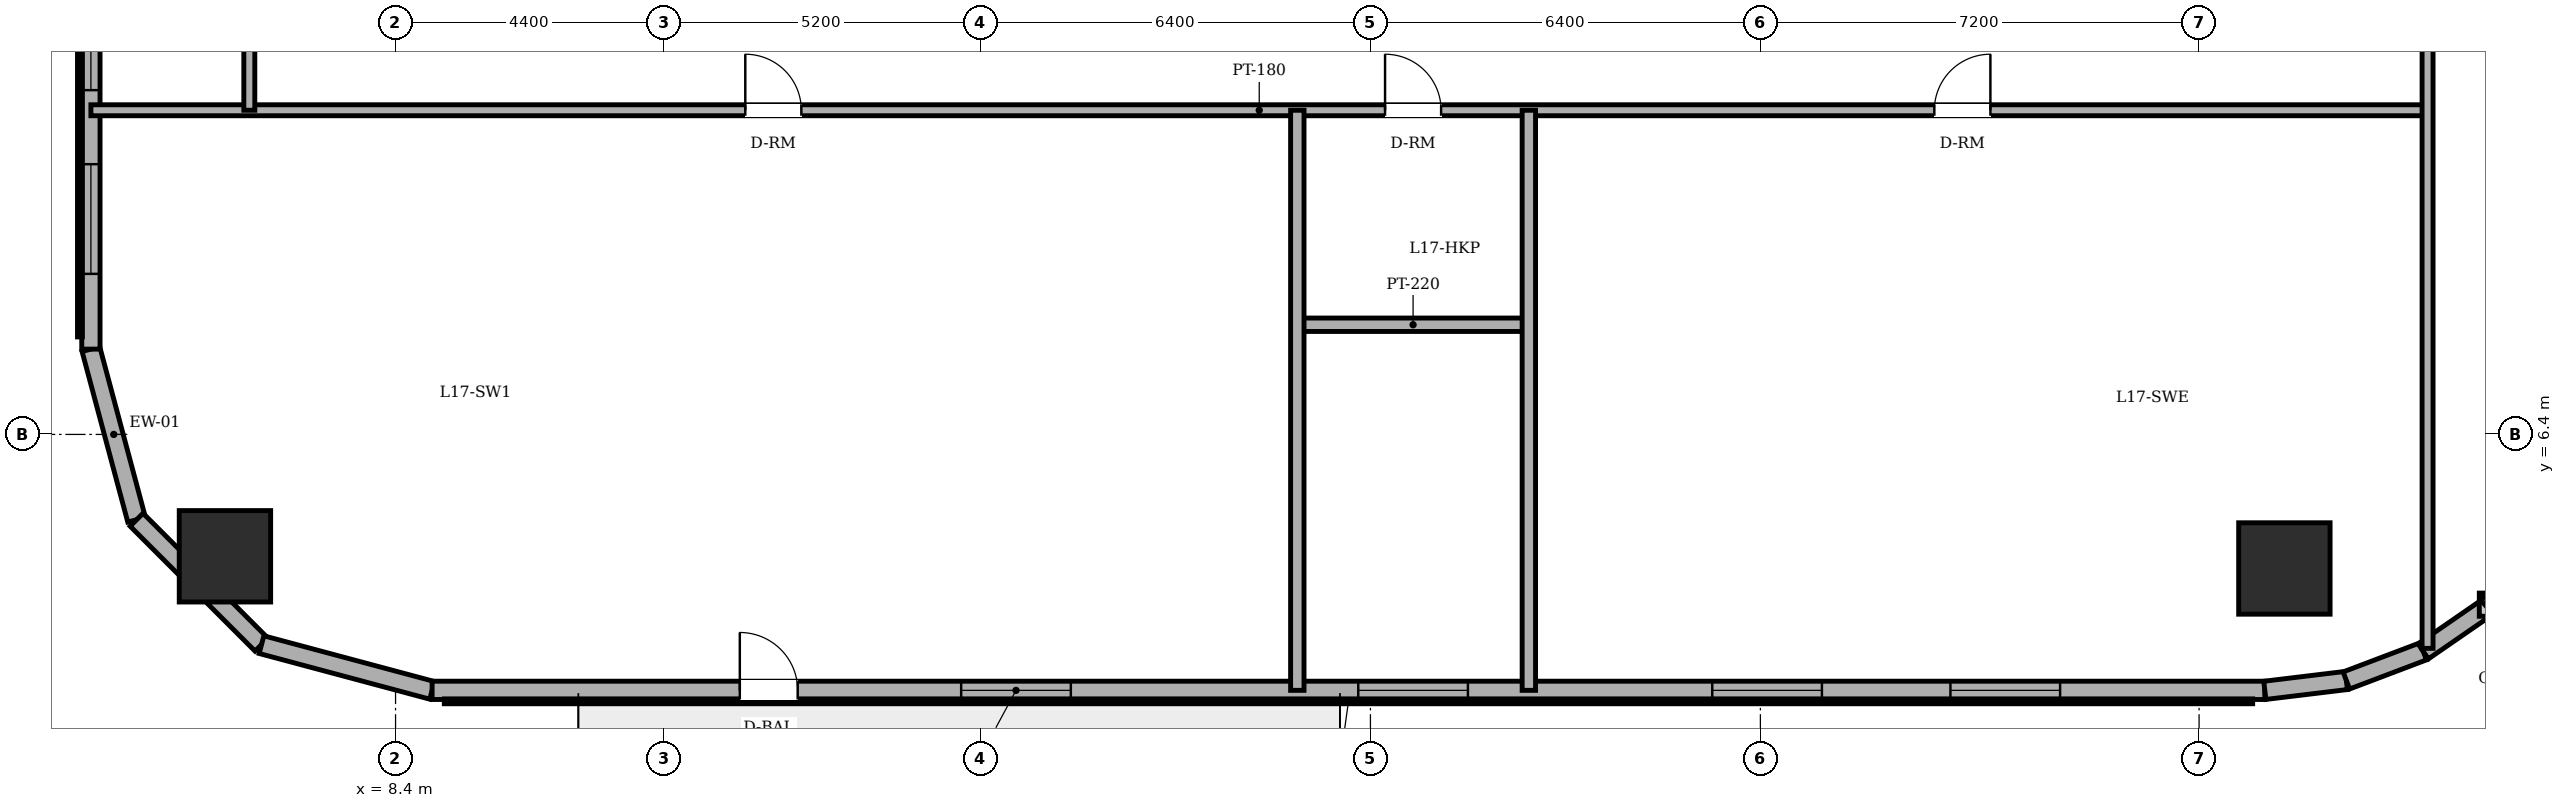
"""IFC4 building model, lengths in metres.
Left out: names, types, materials, properties, quantities, classifications, styles, units other than length and angle.
Written with IfcOpenShell. Run it as: python <this file> out.ifc"""

import sys

from ifc_helpers import new_model, si_unit, direction, frame, frame_2d, origin, origin_2d, place, context, subcontext, project, spatial, rectangle, circle, extrude, element, fill, save


model = new_model("IFC4")
c1 = context("Model", 3, precision=1e-05, world=origin(), true_north=direction((0.0, 1.0)))
c2 = subcontext(c1, "Body", "Model", "MODEL_VIEW")
j1 = project(units=[si_unit("LENGTHUNIT", "METRE"), si_unit("PLANEANGLEUNIT", "RADIAN")], contexts=[c1])
p1 = place(None, origin())
s1 = spatial("IfcSite", under=j1, at=p1, CompositionType="ELEMENT")
p2 = place(p1, origin())
s2 = spatial("IfcBuilding", under=s1, at=p2, CompositionType="ELEMENT")
p3 = place(p2, frame((0.0, 0.0, 64.8)))
s3 = spatial("IfcBuildingStorey", under=s2, at=p3, CompositionType="ELEMENT", Elevation=64.8)
for number, where, z_axis, x_axis in (
    (1, (5.6, 4.4, 0.0), (0.0, 0.0, 1.0), (1.0, 0.0, 0.0)),
    (2, (39.4, 4.2, 0.0), (0.0, 0.0, 1.0), (1.0, 0.0, 0.0)),
):
    element("IfcColumn", number, at=place(p3, frame(where, z_axis=z_axis, x_axis=x_axis)), inside=s3, PredefinedType="COLUMN", context=c2, shape_type="SweptSolid", body=[
        extrude(circle(Radius=0.75, at=origin_2d()), origin(), (0.0, 0.0, 1.0), 3.6),
    ])
p4 = place(p3, frame((3.4, 7.8, 0.0), z_axis=(0.0, 0.0, 1.0), x_axis=(0.258731875344, -0.96594917914, 0.0)))
e3 = element("IfcWall", 3, at=p4, inside=s3, PredefinedType="SOLIDWALL", context=c2, shape_type="SweptSolid", body=[
    extrude(rectangle(XDim=2.899, YDim=0.3, at=frame_2d((1.449, 0.0))), origin(), (0.0, 0.0, 1.0), 3.4),
])
p5 = place(p3, frame((4.15, 5.0, 0.0), z_axis=(0.0, 0.0, 1.0), x_axis=(0.707106781187, -0.707106781187, 0.0)))
e4 = element("IfcWall", 4, at=p5, inside=s3, PredefinedType="SOLIDWALL", context=c2, shape_type="SweptSolid", body=[
    extrude(rectangle(XDim=2.899, YDim=0.3, at=frame_2d((1.45, 0.0))), origin(), (0.0, 0.0, 1.0), 3.4),
])
p6 = place(p3, frame((6.2, 2.95, 0.0), z_axis=(0.0, 0.0, 1.0), x_axis=(0.96594917914, -0.258731875344, 0.0)))
e5 = element("IfcWall", 5, at=p6, inside=s3, PredefinedType="SOLIDWALL", context=c2, shape_type="SweptSolid", body=[
    extrude(rectangle(XDim=2.899, YDim=0.3, at=frame_2d((1.449, 0.0))), origin(), (0.0, 0.0, 1.0), 3.4),
])
p7 = place(p3, frame((9.0, 2.2, 0.0), z_axis=(0.0, 0.0, 1.0), x_axis=(1.0, 0.0, 0.0)))
e6 = element("IfcWall", 6, at=p7, inside=s3, PredefinedType="SOLIDWALL", context=c2, shape_type="SweptSolid", body=[
    extrude(rectangle(XDim=30.079, YDim=0.3, at=frame_2d((15.04, 0.0))), origin(), (0.0, 0.0, 1.0), 3.4),
])
p8 = place(p7, frame((5.05, 0.0, 0.0)))
e7 = element("IfcOpeningElement", 7, at=p8, cuts=e6, PredefinedType="OPENING", context=c2, shape_type="SweptSolid", body=[
    extrude(rectangle(XDim=0.95, YDim=2.2, at=frame_2d((0.475, 1.1))), frame((0.0, 0.16, 0.0), z_axis=(0.0, -1.0, 0.0), x_axis=(1.0, 0.0, 0.0)), (0.0, 0.0, 1.0), 0.32),
])
p9 = place(p7, frame((8.683, 0.0, 0.85)))
e8 = element("IfcOpeningElement", 8, at=p9, cuts=e6, PredefinedType="OPENING", context=c2, shape_type="SweptSolid", body=[
    extrude(rectangle(XDim=1.8, YDim=1.55, at=frame_2d((0.9, 0.775))), frame((0.0, 0.16, 0.0), z_axis=(0.0, -1.0, 0.0), x_axis=(1.0, 0.0, 0.0)), (0.0, 0.0, 1.0), 0.32),
])
p10 = place(p7, frame((15.2, 0.0, 0.85)))
e9 = element("IfcOpeningElement", 9, at=p10, cuts=e6, PredefinedType="OPENING", context=c2, shape_type="SweptSolid", body=[
    extrude(rectangle(XDim=1.8, YDim=1.55, at=frame_2d((0.9, 0.775))), frame((0.0, 0.16, 0.0), z_axis=(0.0, -1.0, 0.0), x_axis=(1.0, 0.0, 0.0)), (0.0, 0.0, 1.0), 0.32),
])
p11 = place(p7, frame((21.01, 0.0, 0.85)))
e10 = element("IfcOpeningElement", 10, at=p11, cuts=e6, PredefinedType="OPENING", context=c2, shape_type="SweptSolid", body=[
    extrude(rectangle(XDim=1.8, YDim=1.55, at=frame_2d((0.9, 0.775))), frame((0.0, 0.16, 0.0), z_axis=(0.0, -1.0, 0.0), x_axis=(1.0, 0.0, 0.0)), (0.0, 0.0, 1.0), 0.32),
])
p12 = place(p7, frame((24.919, 0.0, 0.85)))
e11 = element("IfcOpeningElement", 11, at=p12, cuts=e6, PredefinedType="OPENING", context=c2, shape_type="SweptSolid", body=[
    extrude(rectangle(XDim=1.8, YDim=1.55, at=frame_2d((0.9, 0.775))), frame((0.0, 0.16, 0.0), z_axis=(0.0, -1.0, 0.0), x_axis=(1.0, 0.0, 0.0)), (0.0, 0.0, 1.0), 0.32),
])
p13 = place(p3, frame((39.079, 2.2, 0.0), z_axis=(0.0, 0.0, 1.0), x_axis=(0.992739027259, 0.120288086515, 0.0)))
e12 = element("IfcWall", 12, at=p13, inside=s3, PredefinedType="SOLIDWALL", context=c2, shape_type="SweptSolid", body=[
    extrude(rectangle(XDim=1.348, YDim=0.3, at=frame_2d((0.674, 0.0))), origin(), (0.0, 0.0, 1.0), 3.4),
])
p14 = place(p3, frame((40.417, 2.362, 0.0), z_axis=(0.0, 0.0, 1.0), x_axis=(0.935156721165, 0.354234254216, 0.0)))
e13 = element("IfcWall", 13, at=p14, inside=s3, PredefinedType="SOLIDWALL", context=c2, shape_type="SweptSolid", body=[
    extrude(rectangle(XDim=1.349, YDim=0.3, at=frame_2d((0.675, 0.0))), origin(), (0.0, 0.0, 1.0), 3.4),
])
p15 = place(p3, frame((41.679, 2.84, 0.0), z_axis=(0.0, 0.0, 1.0), x_axis=(0.823116500192, 0.567872544777, 0.0)))
e14 = element("IfcWall", 14, at=p15, inside=s3, PredefinedType="SOLIDWALL", context=c2, shape_type="SweptSolid", body=[
    extrude(rectangle(XDim=1.349, YDim=0.3, at=frame_2d((0.674, 0.0))), origin(), (0.0, 0.0, 1.0), 3.4),
])
p16 = place(p3, frame((3.4, 40.2, 0.0), z_axis=(0.0, 0.0, 1.0), x_axis=(0.0, -1.0, 0.0)))
e15 = element("IfcWall", 15, at=p16, inside=s3, PredefinedType="SOLIDWALL", context=c2, shape_type="SweptSolid", body=[
    extrude(rectangle(XDim=32.4, YDim=0.3, at=frame_2d((16.2, 0.0))), origin(), (0.0, 0.0, 1.0), 3.4),
])
p17 = place(p16, frame((1.235, 0.0, 0.85)))
e16 = element("IfcOpeningElement", 16, at=p17, cuts=e15, PredefinedType="OPENING", context=c2, shape_type="SweptSolid", body=[
    extrude(rectangle(XDim=1.8, YDim=1.55, at=frame_2d((0.9, 0.775))), frame((0.0, 0.16, 0.0), z_axis=(0.0, -1.0, 0.0), x_axis=(1.0, 0.0, 0.0)), (0.0, 0.0, 1.0), 0.32),
])
p18 = place(p16, frame((4.25, 0.0, 0.85)))
e17 = element("IfcOpeningElement", 17, at=p18, cuts=e15, PredefinedType="OPENING", context=c2, shape_type="SweptSolid", body=[
    extrude(rectangle(XDim=1.8, YDim=1.55, at=frame_2d((0.9, 0.775))), frame((0.0, 0.16, 0.0), z_axis=(0.0, -1.0, 0.0), x_axis=(1.0, 0.0, 0.0)), (0.0, 0.0, 1.0), 0.32),
])
p19 = place(p16, frame((12.027, 0.0, 0.85)))
e18 = element("IfcOpeningElement", 18, at=p19, cuts=e15, PredefinedType="OPENING", context=c2, shape_type="SweptSolid", body=[
    extrude(rectangle(XDim=1.8, YDim=1.55, at=frame_2d((0.9, 0.775))), frame((0.0, 0.16, 0.0), z_axis=(0.0, -1.0, 0.0), x_axis=(1.0, 0.0, 0.0)), (0.0, 0.0, 1.0), 0.32),
])
p20 = place(p16, frame((18.573, 0.0, 0.85)))
e19 = element("IfcOpeningElement", 19, at=p20, cuts=e15, PredefinedType="OPENING", context=c2, shape_type="SweptSolid", body=[
    extrude(rectangle(XDim=1.8, YDim=1.55, at=frame_2d((0.9, 0.775))), frame((0.0, 0.16, 0.0), z_axis=(0.0, -1.0, 0.0), x_axis=(1.0, 0.0, 0.0)), (0.0, 0.0, 1.0), 0.32),
])
p21 = place(p16, frame((26.35, 0.0, 0.85)))
e20 = element("IfcOpeningElement", 20, at=p21, cuts=e15, PredefinedType="OPENING", context=c2, shape_type="SweptSolid", body=[
    extrude(rectangle(XDim=1.8, YDim=1.55, at=frame_2d((0.9, 0.775))), frame((0.0, 0.16, 0.0), z_axis=(0.0, -1.0, 0.0), x_axis=(1.0, 0.0, 0.0)), (0.0, 0.0, 1.0), 0.32),
])
p22 = place(p16, frame((29.365, 0.0, 0.85)))
e21 = element("IfcOpeningElement", 21, at=p22, cuts=e15, PredefinedType="OPENING", context=c2, shape_type="SweptSolid", body=[
    extrude(rectangle(XDim=1.8, YDim=1.55, at=frame_2d((0.9, 0.775))), frame((0.0, 0.16, 0.0), z_axis=(0.0, -1.0, 0.0), x_axis=(1.0, 0.0, 0.0)), (0.0, 0.0, 1.0), 0.32),
])
p23 = place(p3, frame((23.2, 8.2, 0.0), z_axis=(0.0, 0.0, 1.0), x_axis=(1.0, 0.0, 0.0)))
e22 = element("IfcWall", 22, at=p23, inside=s3, PredefinedType="PARTITIONING", context=c2, shape_type="SweptSolid", body=[
    extrude(rectangle(XDim=3.8, YDim=0.22, at=frame_2d((1.9, 0.0))), origin(), (0.0, 0.0, 1.0), 3.4),
])
p24 = place(p3, frame((3.4, 11.72, 0.0), z_axis=(0.0, 0.0, 1.0), x_axis=(1.0, 0.0, 0.0)))
e23 = element("IfcWall", 23, at=p24, inside=s3, PredefinedType="PARTITIONING", context=c2, shape_type="SweptSolid", body=[
    extrude(rectangle(XDim=38.35, YDim=0.18, at=frame_2d((19.175, 0.0))), origin(), (0.0, 0.0, 1.0), 3.4),
])
p25 = place(p24, frame((21.24, 0.0, 0.0)))
e24 = element("IfcOpeningElement", 24, at=p25, cuts=e23, PredefinedType="OPENING", context=c2, shape_type="SweptSolid", body=[
    extrude(rectangle(XDim=0.92, YDim=2.1, at=frame_2d((0.46, 1.05))), frame((0.0, 0.1, 0.0), z_axis=(0.0, -1.0, 0.0), x_axis=(1.0, 0.0, 0.0)), (0.0, 0.0, 1.0), 0.2),
])
p26 = place(p24, frame((10.74, 0.0, 0.0)))
e25 = element("IfcOpeningElement", 25, at=p26, cuts=e23, PredefinedType="OPENING", context=c2, shape_type="SweptSolid", body=[
    extrude(rectangle(XDim=0.92, YDim=2.1, at=frame_2d((0.46, 1.05))), frame((0.0, 0.1, 0.0), z_axis=(0.0, -1.0, 0.0), x_axis=(1.0, 0.0, 0.0)), (0.0, 0.0, 1.0), 0.2),
])
p27 = place(p24, frame((30.255, 0.0, 0.0)))
e26 = element("IfcOpeningElement", 26, at=p27, cuts=e23, PredefinedType="OPENING", context=c2, shape_type="SweptSolid", body=[
    extrude(rectangle(XDim=0.92, YDim=2.1, at=frame_2d((0.46, 1.05))), frame((0.0, 0.1, 0.0), z_axis=(0.0, -1.0, 0.0), x_axis=(1.0, 0.0, 0.0)), (0.0, 0.0, 1.0), 0.2),
])
p28 = place(p3, frame((6.0, 11.72, 0.0), z_axis=(0.0, 0.0, 1.0), x_axis=(0.0, 1.0, 0.0)))
e27 = element("IfcWall", 27, at=p28, inside=s3, PredefinedType="PARTITIONING", context=c2, shape_type="SweptSolid", body=[
    extrude(rectangle(XDim=2.46, YDim=0.18, at=frame_2d((1.23, 0.0))), origin(), (0.0, 0.0, 1.0), 3.4),
])
for number, where, z_axis, x_axis in (
    (28, (23.2, 2.2, 0.0), (0.0, 0.0, 1.0), (0.0, 1.0, 0.0)),
    (29, (27.0, 2.2, 0.0), (0.0, 0.0, 1.0), (0.0, 1.0, 0.0)),
):
    element("IfcWall", number, at=place(p3, frame(where, z_axis=z_axis, x_axis=x_axis)), inside=s3, PredefinedType="PARTITIONING", context=c2, shape_type="SweptSolid", body=[
        extrude(rectangle(XDim=9.52, YDim=0.22, at=frame_2d((4.76, 0.0))), origin(), (0.0, 0.0, 1.0), 3.4),
    ])
p29 = place(p3, frame((41.75, 2.889, 0.0), z_axis=(0.0, 0.0, 1.0), x_axis=(0.0, 1.0, 0.0)))
e30 = element("IfcWall", 30, at=p29, inside=s3, PredefinedType="PARTITIONING", context=c2, shape_type="SweptSolid", body=[
    extrude(rectangle(XDim=19.931, YDim=0.18, at=frame_2d((9.966, 0.0))), origin(), (0.0, 0.0, 1.0), 2.782),
])
p30 = place(p29, frame((13.661, 0.0, 0.0)))
e31 = element("IfcOpeningElement", 31, at=p30, cuts=e30, PredefinedType="OPENING", context=c2, shape_type="SweptSolid", body=[
    extrude(rectangle(XDim=0.92, YDim=2.1, at=frame_2d((0.46, 1.05))), frame((0.0, 0.1, 0.0), z_axis=(0.0, -1.0, 0.0), x_axis=(1.0, 0.0, 0.0)), (0.0, 0.0, 1.0), 0.2),
])
p31 = place(p8, origin())
e32 = element("IfcDoor", 32, at=p31, inside=s3, OperationType="SINGLE_SWING_LEFT", PredefinedType="DOOR", context=c2, shape_type="SweptSolid", body=[
    extrude(rectangle(XDim=0.95, YDim=2.2, at=frame_2d((0.475, 1.1))), frame((0.0, 0.025, 0.0), z_axis=(0.0, -1.0, 0.0), x_axis=(1.0, 0.0, 0.0)), (0.0, 0.0, 1.0), 0.05),
])
fill(e7, e32)
p32 = place(p9, origin())
e33 = element("IfcWindow", 33, at=p32, inside=s3, PartitioningType="DOUBLE_PANEL_VERTICAL", PredefinedType="WINDOW", context=c2, shape_type="SweptSolid", body=[
    extrude(rectangle(XDim=1.8, YDim=1.55, at=frame_2d((0.9, 0.775))), frame((0.0, 0.03, 0.0), z_axis=(0.0, -1.0, 0.0), x_axis=(1.0, 0.0, 0.0)), (0.0, 0.0, 1.0), 0.06),
])
fill(e8, e33)
p33 = place(p10, origin())
e34 = element("IfcWindow", 34, at=p33, inside=s3, PartitioningType="DOUBLE_PANEL_VERTICAL", PredefinedType="WINDOW", context=c2, shape_type="SweptSolid", body=[
    extrude(rectangle(XDim=1.8, YDim=1.55, at=frame_2d((0.9, 0.775))), frame((0.0, 0.03, 0.0), z_axis=(0.0, -1.0, 0.0), x_axis=(1.0, 0.0, 0.0)), (0.0, 0.0, 1.0), 0.06),
])
fill(e9, e34)
p34 = place(p11, origin())
e35 = element("IfcWindow", 35, at=p34, inside=s3, PartitioningType="DOUBLE_PANEL_VERTICAL", PredefinedType="WINDOW", context=c2, shape_type="SweptSolid", body=[
    extrude(rectangle(XDim=1.8, YDim=1.55, at=frame_2d((0.9, 0.775))), frame((0.0, 0.03, 0.0), z_axis=(0.0, -1.0, 0.0), x_axis=(1.0, 0.0, 0.0)), (0.0, 0.0, 1.0), 0.06),
])
fill(e10, e35)
p35 = place(p12, origin())
e36 = element("IfcWindow", 36, at=p35, inside=s3, PartitioningType="DOUBLE_PANEL_VERTICAL", PredefinedType="WINDOW", context=c2, shape_type="SweptSolid", body=[
    extrude(rectangle(XDim=1.8, YDim=1.55, at=frame_2d((0.9, 0.775))), frame((0.0, 0.03, 0.0), z_axis=(0.0, -1.0, 0.0), x_axis=(1.0, 0.0, 0.0)), (0.0, 0.0, 1.0), 0.06),
])
fill(e11, e36)
p36 = place(p21, origin())
e37 = element("IfcWindow", 37, at=p36, inside=s3, PartitioningType="DOUBLE_PANEL_VERTICAL", PredefinedType="WINDOW", context=c2, shape_type="SweptSolid", body=[
    extrude(rectangle(XDim=1.8, YDim=1.55, at=frame_2d((0.9, 0.775))), frame((0.0, 0.03, 0.0), z_axis=(0.0, -1.0, 0.0), x_axis=(1.0, 0.0, 0.0)), (0.0, 0.0, 1.0), 0.06),
])
fill(e20, e37)
p37 = place(p22, origin())
e38 = element("IfcWindow", 38, at=p37, inside=s3, PartitioningType="DOUBLE_PANEL_VERTICAL", PredefinedType="WINDOW", context=c2, shape_type="SweptSolid", body=[
    extrude(rectangle(XDim=1.8, YDim=1.55, at=frame_2d((0.9, 0.775))), frame((0.0, 0.03, 0.0), z_axis=(0.0, -1.0, 0.0), x_axis=(1.0, 0.0, 0.0)), (0.0, 0.0, 1.0), 0.06),
])
fill(e21, e38)
p38 = place(p25, origin())
e39 = element("IfcDoor", 39, at=p38, inside=s3, OperationType="SINGLE_SWING_LEFT", PredefinedType="DOOR", context=c2, shape_type="SweptSolid", body=[
    extrude(rectangle(XDim=0.92, YDim=2.1, at=frame_2d((0.46, 1.05))), frame((0.0, 0.025, 0.0), z_axis=(0.0, -1.0, 0.0), x_axis=(1.0, 0.0, 0.0)), (0.0, 0.0, 1.0), 0.05),
])
fill(e24, e39)
p39 = place(p26, origin())
e40 = element("IfcDoor", 40, at=p39, inside=s3, OperationType="SINGLE_SWING_LEFT", PredefinedType="DOOR", context=c2, shape_type="SweptSolid", body=[
    extrude(rectangle(XDim=0.92, YDim=2.1, at=frame_2d((0.46, 1.05))), frame((0.0, 0.025, 0.0), z_axis=(0.0, -1.0, 0.0), x_axis=(1.0, 0.0, 0.0)), (0.0, 0.0, 1.0), 0.05),
])
fill(e25, e40)
p40 = place(p27, origin())
e41 = element("IfcDoor", 41, at=p40, inside=s3, OperationType="SINGLE_SWING_RIGHT", PredefinedType="DOOR", context=c2, shape_type="SweptSolid", body=[
    extrude(rectangle(XDim=0.92, YDim=2.1, at=frame_2d((0.46, 1.05))), frame((0.0, 0.025, 0.0), z_axis=(0.0, -1.0, 0.0), x_axis=(1.0, 0.0, 0.0)), (0.0, 0.0, 1.0), 0.05),
])
fill(e26, e41)
save(model, sys.argv[1])
